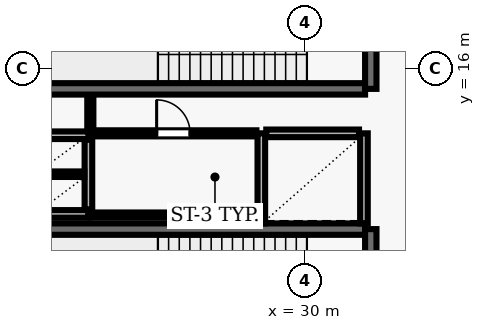
"""IFC4 building model, lengths in metres.
Left out: names, types, materials, properties, quantities, classifications, styles, units other than length and angle.
Written with IfcOpenShell. Run it as: python <this file> out.ifc"""

import sys

from ifc_helpers import new_model, si_unit, direction, frame, frame_2d, origin, place, context, subcontext, project, spatial, rectangle, extrude, element, fill, save


model = new_model("IFC4")
c1 = context("Model", 3, precision=1e-05, world=origin(), true_north=direction((0.0, 1.0)))
c2 = subcontext(c1, "Body", "Model", "MODEL_VIEW")
j1 = project(units=[si_unit("LENGTHUNIT", "METRE"), si_unit("PLANEANGLEUNIT", "RADIAN")], contexts=[c1])
p1 = place(None, origin())
s1 = spatial("IfcSite", under=j1, at=p1, CompositionType="ELEMENT")
p2 = place(p1, origin())
s2 = spatial("IfcBuilding", under=s1, at=p2, CompositionType="ELEMENT")
p3 = place(p2, frame((0.0, 0.0, 26.0)))
s3 = spatial("IfcBuildingStorey", under=s2, at=p3, CompositionType="ELEMENT", Elevation=26.0)
p4 = place(p3, frame((23.22, 15.47, 0.0), z_axis=(0.0, 0.0, 1.0), x_axis=(1.0, 0.0, 0.0)))
e1 = element("IfcWall", 1, at=p4, inside=s3, PredefinedType="SHEAR", context=c2, shape_type="SweptSolid", body=[
    extrude(rectangle(XDim=8.36, YDim=0.3, at=frame_2d((4.18, 0.0))), origin(), (0.0, 0.0, 1.0), 4.79),
])
p5 = place(p3, frame((31.73, 15.47, 0.0), z_axis=(0.0, 0.0, 1.0), x_axis=(0.0, 1.0, 0.0)))
e2 = element("IfcWall", 2, at=p5, inside=s3, PredefinedType="SHEAR", context=c2, shape_type="SweptSolid", body=[
    extrude(rectangle(XDim=3.51, YDim=0.3, at=frame_2d((1.755, 0.0))), origin(), (0.0, 0.0, 1.0), 4.79),
])
p6 = place(p5, frame((1.18, 0.0, 0.0)))
e3 = element("IfcOpeningElement", 3, at=p6, cuts=e2, PredefinedType="OPENING", context=c2, shape_type="SweptSolid", body=[
    extrude(rectangle(XDim=1.15, YDim=2.15, at=frame_2d((0.575, 1.075))), frame((0.0, 0.16, 0.0), z_axis=(0.0, -1.0, 0.0), x_axis=(1.0, 0.0, 0.0)), (0.0, 0.0, 1.0), 0.32),
])
p7 = place(p3, frame((31.58, 11.78, 0.0), z_axis=(0.0, 0.0, 1.0), x_axis=(-1.0, 0.0, 0.0)))
e4 = element("IfcWall", 4, at=p7, inside=s3, PredefinedType="SHEAR", context=c2, shape_type="SweptSolid", body=[
    extrude(rectangle(XDim=8.36, YDim=0.3, at=frame_2d((4.18, 0.0))), origin(), (0.0, 0.0, 1.0), 4.79),
])
p8 = place(p3, frame((31.73, 8.27, 0.0), z_axis=(0.0, 0.0, 1.0), x_axis=(0.0, 1.0, 0.0)))
e5 = element("IfcWall", 5, at=p8, inside=s3, PredefinedType="SHEAR", context=c2, shape_type="SweptSolid", body=[
    extrude(rectangle(XDim=3.51, YDim=0.3, at=frame_2d((1.755, 0.0))), origin(), (0.0, 0.0, 1.0), 4.79),
])
p9 = place(p8, frame((1.18, 0.0, 0.0)))
e6 = element("IfcOpeningElement", 6, at=p9, cuts=e5, PredefinedType="OPENING", context=c2, shape_type="SweptSolid", body=[
    extrude(rectangle(XDim=1.15, YDim=2.15, at=frame_2d((0.575, 1.075))), frame((0.0, 0.16, 0.0), z_axis=(0.0, -1.0, 0.0), x_axis=(1.0, 0.0, 0.0)), (0.0, 0.0, 1.0), 0.32),
])
for number, where, z_axis, x_axis in (
    (7, (28.85, 14.3, 0.0), (0.0, 0.0, 1.0), (0.0, -1.0, 0.0)),
    (8, (31.55, 11.93, 0.0), (0.0, 0.0, 1.0), (0.0, 1.0, 0.0)),
):
    element("IfcWall", number, at=place(p3, frame(where, z_axis=z_axis, x_axis=x_axis)), inside=s3, PredefinedType="SOLIDWALL", context=c2, shape_type="SweptSolid", body=[
        extrude(rectangle(XDim=2.37, YDim=0.2, at=frame_2d((1.185, 0.0))), origin(), (0.0, 0.0, 1.0), 4.79),
    ])
p10 = place(p3, frame((31.42, 14.3, 0.0), z_axis=(0.0, 0.0, 1.0), x_axis=(-1.0, 0.0, 0.0)))
e9 = element("IfcWall", 9, at=p10, inside=s3, PredefinedType="SOLIDWALL", context=c2, shape_type="SweptSolid", body=[
    extrude(rectangle(XDim=2.44, YDim=0.2, at=frame_2d((1.22, 0.0))), origin(), (0.0, 0.0, 1.0), 4.79),
])
for number, where, z_axis, x_axis in (
    (10, (22.9, 14.25, 0.0), (0.0, 0.0, 1.0), (1.0, 0.0, 0.0)),
    (11, (22.9, 12.18, 0.0), (0.0, 0.0, 1.0), (1.0, 0.0, 0.0)),
):
    element("IfcWall", number, at=place(p3, frame(where, z_axis=z_axis, x_axis=x_axis)), inside=s3, PredefinedType="SOLIDWALL", context=c2, shape_type="SweptSolid", body=[
        extrude(rectangle(XDim=1.4, YDim=0.2, at=frame_2d((0.7, 0.0))), origin(), (0.0, 0.0, 1.0), 4.79),
    ])
p11 = place(p3, frame((24.3, 12.3, 0.0), z_axis=(0.0, 0.0, 1.0), x_axis=(0.0, 1.0, 0.0)))
e12 = element("IfcWall", 12, at=p11, inside=s3, PredefinedType="SOLIDWALL", context=c2, shape_type="SweptSolid", body=[
    extrude(rectangle(XDim=1.83, YDim=0.2, at=frame_2d((0.915, 0.0))), origin(), (0.0, 0.0, 1.0), 4.79),
])
p12 = place(p3, frame((23.01, 13.225, 0.0), z_axis=(0.0, 0.0, 1.0), x_axis=(1.0, 0.0, 0.0)))
e13 = element("IfcWall", 13, at=p12, inside=s3, PredefinedType="PARTITIONING", context=c2, shape_type="SweptSolid", body=[
    extrude(rectangle(XDim=1.18, YDim=0.145, at=frame_2d((0.59, 0.0))), origin(), (0.0, 0.0, 1.0), 4.79),
])
p13 = place(p3, frame((24.35, 12.15, 0.0), z_axis=(0.0, 0.0, 1.0), x_axis=(1.0, 0.0, 0.0)))
e14 = element("IfcWall", 14, at=p13, inside=s3, PredefinedType="PARTITIONING", context=c2, shape_type="SweptSolid", body=[
    extrude(rectangle(XDim=4.37, YDim=0.135, at=frame_2d((2.185, 0.0))), origin(), (0.0, 0.0, 1.0), 4.79),
])
p14 = place(p3, frame((24.35, 14.3, 0.0), z_axis=(0.0, 0.0, 1.0), x_axis=(1.0, 0.0, 0.0)))
e15 = element("IfcWall", 15, at=p14, inside=s3, PredefinedType="PARTITIONING", context=c2, shape_type="SweptSolid", body=[
    extrude(rectangle(XDim=4.37, YDim=0.16, at=frame_2d((2.185, 0.0))), origin(), (0.0, 0.0, 1.0), 4.79),
])
p15 = place(p14, frame((1.745, 0.0, 0.0)))
e16 = element("IfcOpeningElement", 16, at=p15, cuts=e15, PredefinedType="OPENING", context=c2, shape_type="SweptSolid", body=[
    extrude(rectangle(XDim=0.88, YDim=2.1, at=frame_2d((0.44, 1.05))), frame((0.0, 0.09, 0.0), z_axis=(0.0, -1.0, 0.0), x_axis=(1.0, 0.0, 0.0)), (0.0, 0.0, 1.0), 0.18),
])
p16 = place(p3, frame((24.35, 15.29, 0.0), z_axis=(0.0, 0.0, 1.0), x_axis=(0.0, -1.0, 0.0)))
e17 = element("IfcWall", 17, at=p16, inside=s3, PredefinedType="PARTITIONING", context=c2, shape_type="SweptSolid", body=[
    extrude(rectangle(XDim=0.915, YDim=0.16, at=frame_2d((0.458, 0.0))), origin(), (0.0, 0.0, 1.0), 4.79),
])
p17 = place(p15, origin())
e18 = element("IfcDoor", 18, at=p17, inside=s3, OperationType="SINGLE_SWING_LEFT", PredefinedType="DOOR", context=c2, shape_type="SweptSolid", body=[
    extrude(rectangle(XDim=0.88, YDim=2.1, at=frame_2d((0.44, 1.05))), frame((0.0, 0.025, 0.0), z_axis=(0.0, -1.0, 0.0), x_axis=(1.0, 0.0, 0.0)), (0.0, 0.0, 1.0), 0.05),
])
fill(e16, e18)
save(model, sys.argv[1])
